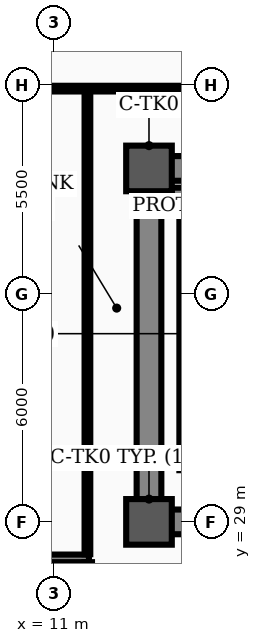
"""IFC4 building model, lengths in metres.
Left out: names, types, materials, properties, quantities, classifications, styles, units other than length and angle.
Written with IfcOpenShell. Run it as: python <this file> out.ifc"""

import sys

from ifc_helpers import new_model, si_unit, direction, frame, frame_2d, origin, origin_2d, place, context, subcontext, project, spatial, rectangle, hollow_rectangle, extrude, element, save


model = new_model("IFC4")
c1 = context("Model", 3, precision=1e-05, world=origin(), true_north=direction((0.0, 1.0)))
c2 = subcontext(c1, "Body", "Model", "MODEL_VIEW")
j1 = project(units=[si_unit("LENGTHUNIT", "METRE"), si_unit("PLANEANGLEUNIT", "RADIAN")], contexts=[c1])
p1 = place(None, origin())
s1 = spatial("IfcSite", under=j1, at=p1, CompositionType="ELEMENT")
p2 = place(p1, origin())
s2 = spatial("IfcBuilding", under=s1, at=p2, CompositionType="ELEMENT")
p3 = place(p2, frame((0.0, 0.0, 5.8)))
s3 = spatial("IfcBuildingStorey", under=s2, at=p3, CompositionType="ELEMENT", Elevation=5.8)
for number, where, z_axis, x_axis in (
    (1, (13.5, 29.0, 0.0), (0.0, 0.0, 1.0), (1.0, 0.0, 0.0)),
    (2, (13.5, 38.3, 0.0), (0.0, 0.0, 1.0), (1.0, 0.0, 0.0)),
):
    element("IfcColumn", number, at=place(p3, frame(where, z_axis=z_axis, x_axis=x_axis)), inside=s3, PredefinedType="COLUMN", context=c2, shape_type="SweptSolid", body=[
        extrude(hollow_rectangle(XDim=1.2, YDim=1.2, WallThickness=0.04, InnerFilletRadius=0.02, OuterFilletRadius=0.06, at=origin_2d()), origin(), (0.0, 0.0, 1.0), 5.4),
    ])
p4 = place(p3, frame((13.5, 29.0, 0.0), z_axis=(0.0, 0.0, 1.0), x_axis=(1.0, 0.0, 0.0)))
e3 = element("IfcWall", 3, at=p4, inside=s3, PredefinedType="SHEAR", context=c2, shape_type="SweptSolid", body=[
    extrude(rectangle(XDim=30.5, YDim=0.65, at=frame_2d((15.25, 0.0))), origin(), (0.0, 0.0, 1.0), 5.15),
])
p5 = place(p4, frame((1.75, 0.0, 0.0)))
e4 = element("IfcOpeningElement", 4, at=p5, cuts=e3, PredefinedType="OPENING", context=c2, shape_type="SweptSolid", body=[
    extrude(rectangle(XDim=1.1, YDim=2.08, at=frame_2d((0.55, 1.04))), frame((0.0, 0.335, 0.0), z_axis=(0.0, -1.0, 0.0), x_axis=(1.0, 0.0, 0.0)), (0.0, 0.0, 1.0), 0.67),
])
p6 = place(p4, frame((26.7, 0.0, 0.0)))
e5 = element("IfcOpeningElement", 5, at=p6, cuts=e3, PredefinedType="OPENING", context=c2, shape_type="SweptSolid", body=[
    extrude(rectangle(XDim=1.1, YDim=2.08, at=frame_2d((0.55, 1.04))), frame((0.0, 0.335, 0.0), z_axis=(0.0, -1.0, 0.0), x_axis=(1.0, 0.0, 0.0)), (0.0, 0.0, 1.0), 0.67),
])
p7 = place(p4, frame((6.8, 0.0, 0.0)))
e6 = element("IfcOpeningElement", 6, at=p7, cuts=e3, PredefinedType="OPENING", context=c2, shape_type="SweptSolid", body=[
    extrude(rectangle(XDim=1.1, YDim=2.08, at=frame_2d((0.55, 1.04))), frame((0.0, 0.335, 0.0), z_axis=(0.0, -1.0, 0.0), x_axis=(1.0, 0.0, 0.0)), (0.0, 0.0, 1.0), 0.67),
])
p8 = place(p4, frame((13.2, 0.0, 0.0)))
e7 = element("IfcOpeningElement", 7, at=p8, cuts=e3, PredefinedType="OPENING", context=c2, shape_type="SweptSolid", body=[
    extrude(rectangle(XDim=1.6, YDim=2.08, at=frame_2d((0.8, 1.04))), frame((0.0, 0.335, 0.0), z_axis=(0.0, -1.0, 0.0), x_axis=(1.0, 0.0, 0.0)), (0.0, 0.0, 1.0), 0.67),
])
p9 = place(p4, frame((20.525, 0.0, 0.0)))
e8 = element("IfcOpeningElement", 8, at=p9, cuts=e3, PredefinedType="OPENING", context=c2, shape_type="SweptSolid", body=[
    extrude(rectangle(XDim=0.95, YDim=2.08, at=frame_2d((0.475, 1.04))), frame((0.0, 0.335, 0.0), z_axis=(0.0, -1.0, 0.0), x_axis=(1.0, 0.0, 0.0)), (0.0, 0.0, 1.0), 0.67),
])
p10 = place(p3, frame((13.5, 38.3, 0.0), z_axis=(0.0, 0.0, 1.0), x_axis=(1.0, 0.0, 0.0)))
e9 = element("IfcWall", 9, at=p10, inside=s3, PredefinedType="SHEAR", context=c2, shape_type="SweptSolid", body=[
    extrude(rectangle(XDim=30.5, YDim=0.65, at=frame_2d((15.25, 0.0))), origin(), (0.0, 0.0, 1.0), 5.15),
])
p11 = place(p3, frame((13.5, 29.35, 0.0), z_axis=(0.0, 0.0, 1.0), x_axis=(0.0, 1.0, 0.0)))
e10 = element("IfcWall", 10, at=p11, inside=s3, PredefinedType="SHEAR", context=c2, shape_type="SweptSolid", body=[
    extrude(rectangle(XDim=8.6, YDim=0.65, at=frame_2d((4.3, 0.0))), origin(), (0.0, 0.0, 1.0), 5.15),
])
p12 = place(p3, frame((14.1, 37.669, 0.0), z_axis=(0.0, 0.0, 1.0), x_axis=(1.0, 0.0, 0.0)))
e11 = element("IfcWall", 11, at=p12, inside=s3, PredefinedType="STANDARD", context=c2, shape_type="SweptSolid", body=[
    extrude(rectangle(XDim=3.67, YDim=0.25, at=frame_2d((1.835, 0.0))), origin(), (0.0, 0.0, 1.0), 5.15),
])
p13 = place(p3, frame((14.425, 30.36, 0.0), z_axis=(0.0, 0.0, 1.0), x_axis=(0.0, 1.0, 0.0)))
e12 = element("IfcWall", 12, at=p13, inside=s3, PredefinedType="STANDARD", context=c2, shape_type="SweptSolid", body=[
    extrude(rectangle(XDim=7.184, YDim=0.25, at=frame_2d((3.592, 0.0))), origin(), (0.0, 0.0, 1.0), 5.15),
])
p14 = place(p3, frame((8.56, 28.04, 0.0), z_axis=(0.0, 0.0, 1.0), x_axis=(1.0, 0.0, 0.0)))
e13 = element("IfcWall", 13, at=p14, inside=s3, PredefinedType="STANDARD", context=c2, shape_type="SweptSolid", body=[
    extrude(rectangle(XDim=3.36, YDim=0.2, at=frame_2d((1.68, 0.0))), origin(), (0.0, 0.0, 1.0), 5.15),
])
p15 = place(p3, frame((11.9, 21.1, 0.0), z_axis=(0.0, 0.0, 1.0), x_axis=(0.0, 1.0, 0.0)))
e14 = element("IfcWall", 14, at=p15, inside=s3, PredefinedType="STANDARD", context=c2, shape_type="SweptSolid", body=[
    extrude(rectangle(XDim=6.84, YDim=0.2, at=frame_2d((3.42, 0.0))), origin(), (0.0, 0.0, 1.0), 5.15),
])
p16 = place(p3, frame((0.58, 40.4, 0.0), z_axis=(0.0, 0.0, 1.0), x_axis=(1.0, 0.0, 0.0)))
e15 = element("IfcWall", 15, at=p16, inside=s3, PredefinedType="PARTITIONING", context=c2, shape_type="SweptSolid", body=[
    extrude(rectangle(XDim=53.89, YDim=0.15, at=frame_2d((26.945, 0.0))), origin(), (0.0, 0.0, 1.0), 4.43),
])
p17 = place(p16, frame((17.12, 0.0, 0.0)))
e16 = element("IfcOpeningElement", 16, at=p17, cuts=e15, PredefinedType="OPENING", context=c2, shape_type="SweptSolid", body=[
    extrude(rectangle(XDim=1.6, YDim=2.08, at=frame_2d((0.8, 1.04))), frame((0.0, 0.085, 0.0), z_axis=(0.0, -1.0, 0.0), x_axis=(1.0, 0.0, 0.0)), (0.0, 0.0, 1.0), 0.17),
])
p18 = place(p16, frame((32.87, 0.0, 0.0)))
e17 = element("IfcOpeningElement", 17, at=p18, cuts=e15, PredefinedType="OPENING", context=c2, shape_type="SweptSolid", body=[
    extrude(rectangle(XDim=1.6, YDim=2.08, at=frame_2d((0.8, 1.04))), frame((0.0, 0.085, 0.0), z_axis=(0.0, -1.0, 0.0), x_axis=(1.0, 0.0, 0.0)), (0.0, 0.0, 1.0), 0.17),
])
p19 = place(p3, frame((11.88, 28.15, 0.0), z_axis=(0.0, 0.0, 1.0), x_axis=(0.0, 1.0, 0.0)))
e18 = element("IfcWall", 18, at=p19, inside=s3, PredefinedType="PARTITIONING", context=c2, shape_type="SweptSolid", body=[
    extrude(rectangle(XDim=12.165, YDim=0.15, at=frame_2d((6.083, 0.0))), origin(), (0.0, 0.0, 1.0), 4.33),
])
save(model, sys.argv[1])
